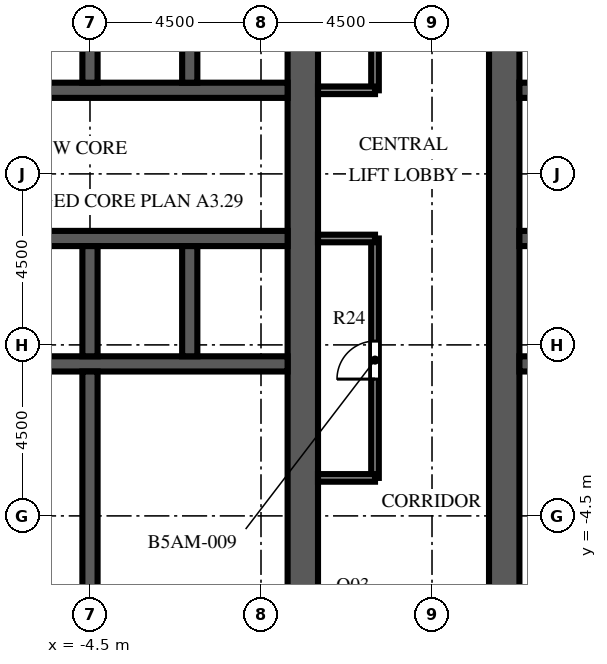
"""IFC4 building model, lengths in metres.
Left out: names, types, materials, properties, quantities, classifications, styles, units other than length and angle.
Written with IfcOpenShell. Run it as: python <this file> out.ifc"""

import sys

from ifc_helpers import new_model, si_unit, direction, frame, frame_2d, origin, place, context, subcontext, project, spatial, rectangle, extrude, element, fill, save


model = new_model("IFC4")
c1 = context("Model", 3, precision=1e-05, world=origin(), true_north=direction((0.0, 1.0)))
c2 = subcontext(c1, "Body", "Model", "MODEL_VIEW")
j1 = project(units=[si_unit("LENGTHUNIT", "METRE"), si_unit("PLANEANGLEUNIT", "RADIAN")], contexts=[c1])
p1 = place(None, origin())
s1 = spatial("IfcSite", under=j1, at=p1, CompositionType="ELEMENT")
p2 = place(p1, origin())
s2 = spatial("IfcBuilding", under=s1, at=p2, CompositionType="ELEMENT")
p3 = place(p2, frame((0.0, 0.0, 185.5)))
s3 = spatial("IfcBuildingStorey", under=s2, at=p3, CompositionType="ELEMENT", Elevation=185.5)
p4 = place(p3, frame((1.1, -9.0, 0.0), z_axis=(0.0, 0.0, 1.0), x_axis=(0.0, 1.0, 0.0)))
e1 = element("IfcWall", 1, at=p4, inside=s3, PredefinedType="SHEAR", context=c2, shape_type="SweptSolid", body=[
    extrude(rectangle(XDim=27.5, YDim=0.8, at=frame_2d((13.75, 0.0))), origin(), (0.0, 0.0, 1.0), 6.0),
])
p5 = place(p4, frame((12.55, 0.0, 0.0)))
e2 = element("IfcOpeningElement", 2, at=p5, cuts=e1, PredefinedType="OPENING", context=c2, shape_type="SweptSolid", body=[
    extrude(rectangle(XDim=2.4, YDim=2.4, at=frame_2d((1.2, 1.2))), frame((0.0, 0.41, 0.0), z_axis=(0.0, -1.0, 0.0), x_axis=(1.0, 0.0, 0.0)), (0.0, 0.0, 1.0), 0.82),
])
p6 = place(p4, frame((3.85, 0.0, 0.0)))
e3 = element("IfcOpeningElement", 3, at=p6, cuts=e1, PredefinedType="OPENING", context=c2, shape_type="SweptSolid", body=[
    extrude(rectangle(XDim=0.95, YDim=2.1, at=frame_2d((0.475, 1.05))), frame((0.0, 0.41, 0.0), z_axis=(0.0, -1.0, 0.0), x_axis=(1.0, 0.0, 0.0)), (0.0, 0.0, 1.0), 0.82),
])
p7 = place(p4, frame((23.475, 0.0, 0.0)))
e4 = element("IfcOpeningElement", 4, at=p7, cuts=e1, PredefinedType="OPENING", context=c2, shape_type="SweptSolid", body=[
    extrude(rectangle(XDim=1.2, YDim=2.1, at=frame_2d((0.6, 1.05))), frame((0.0, 0.41, 0.0), z_axis=(0.0, -1.0, 0.0), x_axis=(1.0, 0.0, 0.0)), (0.0, 0.0, 1.0), 0.82),
])
p8 = place(p3, frame((-9.7, -0.5, 0.0), z_axis=(0.0, 0.0, 1.0), x_axis=(1.0, 0.0, 0.0)))
e5 = element("IfcWall", 5, at=p8, inside=s3, PredefinedType="SHEAR", context=c2, shape_type="SweptSolid", body=[
    extrude(rectangle(XDim=10.4, YDim=0.4, at=frame_2d((5.2, 0.0))), origin(), (0.0, 0.0, 1.0), 6.0),
])
p9 = place(p3, frame((-9.7, 2.8, 0.0), z_axis=(0.0, 0.0, 1.0), x_axis=(1.0, 0.0, 0.0)))
e6 = element("IfcWall", 6, at=p9, inside=s3, PredefinedType="SHEAR", context=c2, shape_type="SweptSolid", body=[
    extrude(rectangle(XDim=10.4, YDim=0.4, at=frame_2d((5.2, 0.0))), origin(), (0.0, 0.0, 1.0), 6.0),
])
p10 = place(p9, frame((0.738, 0.0, 0.0)))
e7 = element("IfcOpeningElement", 7, at=p10, cuts=e6, PredefinedType="OPENING", context=c2, shape_type="SweptSolid", body=[
    extrude(rectangle(XDim=1.1, YDim=2.1, at=frame_2d((0.55, 1.05))), frame((0.0, 0.21, 0.0), z_axis=(0.0, -1.0, 0.0), x_axis=(1.0, 0.0, 0.0)), (0.0, 0.0, 1.0), 0.42),
])
p11 = place(p9, frame((3.337, 0.0, 0.0)))
e8 = element("IfcOpeningElement", 8, at=p11, cuts=e6, PredefinedType="OPENING", context=c2, shape_type="SweptSolid", body=[
    extrude(rectangle(XDim=1.1, YDim=2.1, at=frame_2d((0.55, 1.05))), frame((0.0, 0.21, 0.0), z_axis=(0.0, -1.0, 0.0), x_axis=(1.0, 0.0, 0.0)), (0.0, 0.0, 1.0), 0.42),
])
p12 = place(p9, frame((6.012, 0.0, 0.0)))
e9 = element("IfcOpeningElement", 9, at=p12, cuts=e6, PredefinedType="OPENING", context=c2, shape_type="SweptSolid", body=[
    extrude(rectangle(XDim=1.0, YDim=2.1, at=frame_2d((0.5, 1.05))), frame((0.0, 0.21, 0.0), z_axis=(0.0, -1.0, 0.0), x_axis=(1.0, 0.0, 0.0)), (0.0, 0.0, 1.0), 0.42),
])
p13 = place(p9, frame((8.613, 0.0, 0.0)))
e10 = element("IfcOpeningElement", 10, at=p13, cuts=e6, PredefinedType="OPENING", context=c2, shape_type="SweptSolid", body=[
    extrude(rectangle(XDim=1.0, YDim=2.1, at=frame_2d((0.5, 1.05))), frame((0.0, 0.21, 0.0), z_axis=(0.0, -1.0, 0.0), x_axis=(1.0, 0.0, 0.0)), (0.0, 0.0, 1.0), 0.42),
])
p14 = place(p3, frame((-9.7, 6.7, 0.0), z_axis=(0.0, 0.0, 1.0), x_axis=(1.0, 0.0, 0.0)))
e11 = element("IfcWall", 11, at=p14, inside=s3, PredefinedType="SHEAR", context=c2, shape_type="SweptSolid", body=[
    extrude(rectangle(XDim=10.4, YDim=0.4, at=frame_2d((5.2, 0.0))), origin(), (0.0, 0.0, 1.0), 6.0),
])
p15 = place(p14, frame((3.337, 0.0, 0.0)))
e12 = element("IfcOpeningElement", 12, at=p15, cuts=e11, PredefinedType="OPENING", context=c2, shape_type="SweptSolid", body=[
    extrude(rectangle(XDim=1.1, YDim=2.1, at=frame_2d((0.55, 1.05))), frame((0.0, 0.21, 0.0), z_axis=(0.0, -1.0, 0.0), x_axis=(1.0, 0.0, 0.0)), (0.0, 0.0, 1.0), 0.42),
])
p16 = place(p14, frame((5.962, 0.0, 0.0)))
e13 = element("IfcOpeningElement", 13, at=p16, cuts=e11, PredefinedType="OPENING", context=c2, shape_type="SweptSolid", body=[
    extrude(rectangle(XDim=1.1, YDim=2.1, at=frame_2d((0.55, 1.05))), frame((0.0, 0.21, 0.0), z_axis=(0.0, -1.0, 0.0), x_axis=(1.0, 0.0, 0.0)), (0.0, 0.0, 1.0), 0.42),
])
p17 = place(p14, frame((8.663, 0.0, 0.0)))
e14 = element("IfcOpeningElement", 14, at=p17, cuts=e11, PredefinedType="OPENING", context=c2, shape_type="SweptSolid", body=[
    extrude(rectangle(XDim=1.1, YDim=2.1, at=frame_2d((0.55, 1.05))), frame((0.0, 0.21, 0.0), z_axis=(0.0, -1.0, 0.0), x_axis=(1.0, 0.0, 0.0)), (0.0, 0.0, 1.0), 0.42),
])
p18 = place(p14, frame((0.688, 0.0, 0.0)))
e15 = element("IfcOpeningElement", 15, at=p18, cuts=e11, PredefinedType="OPENING", context=c2, shape_type="SweptSolid", body=[
    extrude(rectangle(XDim=1.0, YDim=2.1, at=frame_2d((0.5, 1.05))), frame((0.0, 0.21, 0.0), z_axis=(0.0, -1.0, 0.0), x_axis=(1.0, 0.0, 0.0)), (0.0, 0.0, 1.0), 0.42),
])
for number, where, z_axis, x_axis in (
    (16, (-4.5, -0.3, 0.0), (0.0, 0.0, 1.0), (0.0, 1.0, 0.0)),
    (17, (-4.5, 6.9, 0.0), (0.0, 0.0, 1.0), (0.0, 1.0, 0.0)),
    (18, (-1.875, -0.3, 0.0), (0.0, 0.0, 1.0), (0.0, 1.0, 0.0)),
    (19, (-1.875, 6.9, 0.0), (0.0, 0.0, 1.0), (0.0, 1.0, 0.0)),
):
    element("IfcWall", number, at=place(p3, frame(where, z_axis=z_axis, x_axis=x_axis)), inside=s3, PredefinedType="SHEAR", context=c2, shape_type="SweptSolid", body=[
        extrude(rectangle(XDim=2.9, YDim=0.4, at=frame_2d((1.45, 0.0))), origin(), (0.0, 0.0, 1.0), 6.0),
    ])
p19 = place(p3, frame((-4.5, -8.2, 0.0), z_axis=(0.0, 0.0, 1.0), x_axis=(0.0, 1.0, 0.0)))
e20 = element("IfcWall", 20, at=p19, inside=s3, PredefinedType="SHEAR", context=c2, shape_type="SweptSolid", body=[
    extrude(rectangle(XDim=7.5, YDim=0.4, at=frame_2d((3.75, 0.0))), origin(), (0.0, 0.0, 1.0), 6.0),
])
p20 = place(p3, frame((6.4, -9.0, 0.0), z_axis=(0.0, 0.0, 1.0), x_axis=(0.0, 1.0, 0.0)))
e21 = element("IfcWall", 21, at=p20, inside=s3, PredefinedType="SHEAR", context=c2, shape_type="SweptSolid", body=[
    extrude(rectangle(XDim=27.5, YDim=0.8, at=frame_2d((13.75, 0.0))), origin(), (0.0, 0.0, 1.0), 6.0),
])
p21 = place(p20, frame((12.55, 0.0, 0.0)))
e22 = element("IfcOpeningElement", 22, at=p21, cuts=e21, PredefinedType="OPENING", context=c2, shape_type="SweptSolid", body=[
    extrude(rectangle(XDim=2.4, YDim=2.4, at=frame_2d((1.2, 1.2))), frame((0.0, 0.41, 0.0), z_axis=(0.0, -1.0, 0.0), x_axis=(1.0, 0.0, 0.0)), (0.0, 0.0, 1.0), 0.82),
])
p22 = place(p20, frame((3.85, 0.0, 0.0)))
e23 = element("IfcOpeningElement", 23, at=p22, cuts=e21, PredefinedType="OPENING", context=c2, shape_type="SweptSolid", body=[
    extrude(rectangle(XDim=0.95, YDim=2.1, at=frame_2d((0.475, 1.05))), frame((0.0, 0.41, 0.0), z_axis=(0.0, -1.0, 0.0), x_axis=(1.0, 0.0, 0.0)), (0.0, 0.0, 1.0), 0.82),
])
p23 = place(p20, frame((23.475, 0.0, 0.0)))
e24 = element("IfcOpeningElement", 24, at=p23, cuts=e21, PredefinedType="OPENING", context=c2, shape_type="SweptSolid", body=[
    extrude(rectangle(XDim=1.2, YDim=2.1, at=frame_2d((0.6, 1.05))), frame((0.0, 0.41, 0.0), z_axis=(0.0, -1.0, 0.0), x_axis=(1.0, 0.0, 0.0)), (0.0, 0.0, 1.0), 0.82),
])
p24 = place(p3, frame((6.8, -0.5, 0.0), z_axis=(0.0, 0.0, 1.0), x_axis=(1.0, 0.0, 0.0)))
e25 = element("IfcWall", 25, at=p24, inside=s3, PredefinedType="SHEAR", context=c2, shape_type="SweptSolid", body=[
    extrude(rectangle(XDim=10.4, YDim=0.4, at=frame_2d((5.2, 0.0))), origin(), (0.0, 0.0, 1.0), 6.0),
])
p25 = place(p3, frame((6.8, 2.8, 0.0), z_axis=(0.0, 0.0, 1.0), x_axis=(1.0, 0.0, 0.0)))
e26 = element("IfcWall", 26, at=p25, inside=s3, PredefinedType="SHEAR", context=c2, shape_type="SweptSolid", body=[
    extrude(rectangle(XDim=10.4, YDim=0.4, at=frame_2d((5.2, 0.0))), origin(), (0.0, 0.0, 1.0), 6.0),
])
p26 = place(p25, frame((0.738, 0.0, 0.0)))
e27 = element("IfcOpeningElement", 27, at=p26, cuts=e26, PredefinedType="OPENING", context=c2, shape_type="SweptSolid", body=[
    extrude(rectangle(XDim=1.1, YDim=2.1, at=frame_2d((0.55, 1.05))), frame((0.0, 0.21, 0.0), z_axis=(0.0, -1.0, 0.0), x_axis=(1.0, 0.0, 0.0)), (0.0, 0.0, 1.0), 0.42),
])
p27 = place(p25, frame((3.337, 0.0, 0.0)))
e28 = element("IfcOpeningElement", 28, at=p27, cuts=e26, PredefinedType="OPENING", context=c2, shape_type="SweptSolid", body=[
    extrude(rectangle(XDim=1.1, YDim=2.1, at=frame_2d((0.55, 1.05))), frame((0.0, 0.21, 0.0), z_axis=(0.0, -1.0, 0.0), x_axis=(1.0, 0.0, 0.0)), (0.0, 0.0, 1.0), 0.42),
])
p28 = place(p25, frame((6.012, 0.0, 0.0)))
e29 = element("IfcOpeningElement", 29, at=p28, cuts=e26, PredefinedType="OPENING", context=c2, shape_type="SweptSolid", body=[
    extrude(rectangle(XDim=1.0, YDim=2.1, at=frame_2d((0.5, 1.05))), frame((0.0, 0.21, 0.0), z_axis=(0.0, -1.0, 0.0), x_axis=(1.0, 0.0, 0.0)), (0.0, 0.0, 1.0), 0.42),
])
p29 = place(p25, frame((8.613, 0.0, 0.0)))
e30 = element("IfcOpeningElement", 30, at=p29, cuts=e26, PredefinedType="OPENING", context=c2, shape_type="SweptSolid", body=[
    extrude(rectangle(XDim=1.0, YDim=2.1, at=frame_2d((0.5, 1.05))), frame((0.0, 0.21, 0.0), z_axis=(0.0, -1.0, 0.0), x_axis=(1.0, 0.0, 0.0)), (0.0, 0.0, 1.0), 0.42),
])
p30 = place(p3, frame((6.8, 6.7, 0.0), z_axis=(0.0, 0.0, 1.0), x_axis=(1.0, 0.0, 0.0)))
e31 = element("IfcWall", 31, at=p30, inside=s3, PredefinedType="SHEAR", context=c2, shape_type="SweptSolid", body=[
    extrude(rectangle(XDim=10.4, YDim=0.4, at=frame_2d((5.2, 0.0))), origin(), (0.0, 0.0, 1.0), 6.0),
])
p31 = place(p30, frame((3.337, 0.0, 0.0)))
e32 = element("IfcOpeningElement", 32, at=p31, cuts=e31, PredefinedType="OPENING", context=c2, shape_type="SweptSolid", body=[
    extrude(rectangle(XDim=1.1, YDim=2.1, at=frame_2d((0.55, 1.05))), frame((0.0, 0.21, 0.0), z_axis=(0.0, -1.0, 0.0), x_axis=(1.0, 0.0, 0.0)), (0.0, 0.0, 1.0), 0.42),
])
p32 = place(p30, frame((5.962, 0.0, 0.0)))
e33 = element("IfcOpeningElement", 33, at=p32, cuts=e31, PredefinedType="OPENING", context=c2, shape_type="SweptSolid", body=[
    extrude(rectangle(XDim=1.1, YDim=2.1, at=frame_2d((0.55, 1.05))), frame((0.0, 0.21, 0.0), z_axis=(0.0, -1.0, 0.0), x_axis=(1.0, 0.0, 0.0)), (0.0, 0.0, 1.0), 0.42),
])
p33 = place(p30, frame((8.663, 0.0, 0.0)))
e34 = element("IfcOpeningElement", 34, at=p33, cuts=e31, PredefinedType="OPENING", context=c2, shape_type="SweptSolid", body=[
    extrude(rectangle(XDim=1.1, YDim=2.1, at=frame_2d((0.55, 1.05))), frame((0.0, 0.21, 0.0), z_axis=(0.0, -1.0, 0.0), x_axis=(1.0, 0.0, 0.0)), (0.0, 0.0, 1.0), 0.42),
])
p34 = place(p30, frame((0.688, 0.0, 0.0)))
e35 = element("IfcOpeningElement", 35, at=p34, cuts=e31, PredefinedType="OPENING", context=c2, shape_type="SweptSolid", body=[
    extrude(rectangle(XDim=1.0, YDim=2.1, at=frame_2d((0.5, 1.05))), frame((0.0, 0.21, 0.0), z_axis=(0.0, -1.0, 0.0), x_axis=(1.0, 0.0, 0.0)), (0.0, 0.0, 1.0), 0.42),
])
p35 = place(p3, frame((-4.3, -5.35, 0.0), z_axis=(0.0, 0.0, 1.0), x_axis=(1.0, 0.0, 0.0)))
e36 = element("IfcWall", 36, at=p35, inside=s3, PredefinedType="PARTITIONING", context=c2, shape_type="SweptSolid", body=[
    extrude(rectangle(XDim=5.0, YDim=0.1, at=frame_2d((2.5, 0.0))), origin(), (0.0, 0.0, 1.0), 5.55),
])
p36 = place(p35, frame((2.0, 0.0, 0.0)))
e37 = element("IfcOpeningElement", 37, at=p36, cuts=e36, PredefinedType="OPENING", context=c2, shape_type="SweptSolid", body=[
    extrude(rectangle(XDim=1.0, YDim=2.1, at=frame_2d((0.5, 1.05))), frame((0.0, 0.06, 0.0), z_axis=(0.0, -1.0, 0.0), x_axis=(1.0, 0.0, 0.0)), (0.0, 0.0, 1.0), 0.12),
])
p37 = place(p3, frame((-2.4, -4.0, 0.0), z_axis=(0.0, 0.0, 1.0), x_axis=(1.0, 0.0, 0.0)))
e38 = element("IfcWall", 38, at=p37, inside=s3, PredefinedType="PARTITIONING", context=c2, shape_type="SweptSolid", body=[
    extrude(rectangle(XDim=3.1, YDim=0.1, at=frame_2d((1.55, 0.0))), origin(), (0.0, 0.0, 1.0), 5.55),
])
p38 = place(p37, frame((1.05, 0.0, 0.0)))
e39 = element("IfcOpeningElement", 39, at=p38, cuts=e38, PredefinedType="OPENING", context=c2, shape_type="SweptSolid", body=[
    extrude(rectangle(XDim=1.0, YDim=2.1, at=frame_2d((0.5, 1.05))), frame((0.0, 0.06, 0.0), z_axis=(0.0, -1.0, 0.0), x_axis=(1.0, 0.0, 0.0)), (0.0, 0.0, 1.0), 0.12),
])
p39 = place(p3, frame((-4.3, -4.0, 0.0), z_axis=(0.0, 0.0, 1.0), x_axis=(1.0, 0.0, 0.0)))
e40 = element("IfcWall", 40, at=p39, inside=s3, PredefinedType="PARTITIONING", context=c2, shape_type="SweptSolid", body=[
    extrude(rectangle(XDim=1.9, YDim=0.1, at=frame_2d((0.95, 0.0))), origin(), (0.0, 0.0, 1.0), 5.55),
])
p40 = place(p39, frame((0.45, 0.0, 0.0)))
e41 = element("IfcOpeningElement", 41, at=p40, cuts=e40, PredefinedType="OPENING", context=c2, shape_type="SweptSolid", body=[
    extrude(rectangle(XDim=1.0, YDim=2.1, at=frame_2d((0.5, 1.05))), frame((0.0, 0.06, 0.0), z_axis=(0.0, -1.0, 0.0), x_axis=(1.0, 0.0, 0.0)), (0.0, 0.0, 1.0), 0.12),
])
p41 = place(p3, frame((-2.4, -4.0, 0.0), z_axis=(0.0, 0.0, 1.0), x_axis=(0.0, 1.0, 0.0)))
e42 = element("IfcWall", 42, at=p41, inside=s3, PredefinedType="PARTITIONING", context=c2, shape_type="SweptSolid", body=[
    extrude(rectangle(XDim=3.3, YDim=0.1, at=frame_2d((1.65, 0.0))), origin(), (0.0, 0.0, 1.0), 5.55),
])
p42 = place(p3, frame((6.8, -5.35, 0.0), z_axis=(0.0, 0.0, 1.0), x_axis=(1.0, 0.0, 0.0)))
e43 = element("IfcWall", 43, at=p42, inside=s3, PredefinedType="PARTITIONING", context=c2, shape_type="SweptSolid", body=[
    extrude(rectangle(XDim=5.0, YDim=0.1, at=frame_2d((2.5, 0.0))), origin(), (0.0, 0.0, 1.0), 5.55),
])
p43 = place(p42, frame((2.0, 0.0, 0.0)))
e44 = element("IfcOpeningElement", 44, at=p43, cuts=e43, PredefinedType="OPENING", context=c2, shape_type="SweptSolid", body=[
    extrude(rectangle(XDim=1.0, YDim=2.1, at=frame_2d((0.5, 1.05))), frame((0.0, 0.06, 0.0), z_axis=(0.0, -1.0, 0.0), x_axis=(1.0, 0.0, 0.0)), (0.0, 0.0, 1.0), 0.12),
])
p44 = place(p3, frame((6.8, -4.0, 0.0), z_axis=(0.0, 0.0, 1.0), x_axis=(1.0, 0.0, 0.0)))
e45 = element("IfcWall", 45, at=p44, inside=s3, PredefinedType="PARTITIONING", context=c2, shape_type="SweptSolid", body=[
    extrude(rectangle(XDim=3.1, YDim=0.1, at=frame_2d((1.55, 0.0))), origin(), (0.0, 0.0, 1.0), 5.55),
])
p45 = place(p44, frame((1.05, 0.0, 0.0)))
e46 = element("IfcOpeningElement", 46, at=p45, cuts=e45, PredefinedType="OPENING", context=c2, shape_type="SweptSolid", body=[
    extrude(rectangle(XDim=1.0, YDim=2.1, at=frame_2d((0.5, 1.05))), frame((0.0, 0.06, 0.0), z_axis=(0.0, -1.0, 0.0), x_axis=(1.0, 0.0, 0.0)), (0.0, 0.0, 1.0), 0.12),
])
p46 = place(p3, frame((3.0, -3.5, 0.0), z_axis=(0.0, 0.0, 1.0), x_axis=(0.0, 1.0, 0.0)))
e47 = element("IfcWall", 47, at=p46, inside=s3, PredefinedType="PARTITIONING", context=c2, shape_type="SweptSolid", body=[
    extrude(rectangle(XDim=6.3, YDim=0.2, at=frame_2d((3.15, 0.0))), origin(), (0.0, 0.0, 1.0), 5.55),
])
p47 = place(p46, frame((2.6, 0.0, 0.0)))
e48 = element("IfcOpeningElement", 48, at=p47, cuts=e47, PredefinedType="OPENING", context=c2, shape_type="SweptSolid", body=[
    extrude(rectangle(XDim=1.0, YDim=2.1, at=frame_2d((0.5, 1.05))), frame((0.0, 0.11, 0.0), z_axis=(0.0, -1.0, 0.0), x_axis=(1.0, 0.0, 0.0)), (0.0, 0.0, 1.0), 0.22),
])
p48 = place(p3, frame((3.0, 6.7, 0.0), z_axis=(0.0, 0.0, 1.0), x_axis=(0.0, 1.0, 0.0)))
e49 = element("IfcWall", 49, at=p48, inside=s3, PredefinedType="PARTITIONING", context=c2, shape_type="SweptSolid", body=[
    extrude(rectangle(XDim=11.8, YDim=0.2, at=frame_2d((5.9, 0.0))), origin(), (0.0, 0.0, 1.0), 5.55),
])
p49 = place(p48, frame((3.85, 0.0, 0.0)))
e50 = element("IfcOpeningElement", 50, at=p49, cuts=e49, PredefinedType="OPENING", context=c2, shape_type="SweptSolid", body=[
    extrude(rectangle(XDim=1.0, YDim=2.1, at=frame_2d((0.5, 1.05))), frame((0.0, 0.11, 0.0), z_axis=(0.0, -1.0, 0.0), x_axis=(1.0, 0.0, 0.0)), (0.0, 0.0, 1.0), 0.22),
])
for number, where, z_axis, x_axis in (
    (51, (1.5, -3.5, 0.0), (0.0, 0.0, 1.0), (1.0, 0.0, 0.0)),
    (52, (1.5, 2.8, 0.0), (0.0, 0.0, 1.0), (1.0, 0.0, 0.0)),
    (53, (1.5, 6.7, 0.0), (0.0, 0.0, 1.0), (1.0, 0.0, 0.0)),
):
    element("IfcWall", number, at=place(p3, frame(where, z_axis=z_axis, x_axis=x_axis)), inside=s3, PredefinedType="PARTITIONING", context=c2, shape_type="SweptSolid", body=[
        extrude(rectangle(XDim=1.5, YDim=0.2, at=frame_2d((0.75, 0.0))), origin(), (0.0, 0.0, 1.0), 5.55),
    ])
p50 = place(p11, origin())
e54 = element("IfcDoor", 54, at=p50, inside=s3, OperationType="DOUBLE_DOOR_SLIDING", PredefinedType="DOOR", context=c2, shape_type="SweptSolid", body=[
    extrude(rectangle(XDim=1.1, YDim=2.1, at=frame_2d((0.55, 1.05))), frame((0.0, 0.025, 0.0), z_axis=(0.0, -1.0, 0.0), x_axis=(1.0, 0.0, 0.0)), (0.0, 0.0, 1.0), 0.05),
])
fill(e8, e54)
p51 = place(p15, origin())
e55 = element("IfcDoor", 55, at=p51, inside=s3, OperationType="DOUBLE_DOOR_SLIDING", PredefinedType="DOOR", context=c2, shape_type="SweptSolid", body=[
    extrude(rectangle(XDim=1.1, YDim=2.1, at=frame_2d((0.55, 1.05))), frame((0.0, 0.025, 0.0), z_axis=(0.0, -1.0, 0.0), x_axis=(1.0, 0.0, 0.0)), (0.0, 0.0, 1.0), 0.05),
])
fill(e12, e55)
p52 = place(p16, origin())
e56 = element("IfcDoor", 56, at=p52, inside=s3, OperationType="DOUBLE_DOOR_SLIDING", PredefinedType="DOOR", context=c2, shape_type="SweptSolid", body=[
    extrude(rectangle(XDim=1.1, YDim=2.1, at=frame_2d((0.55, 1.05))), frame((0.0, 0.025, 0.0), z_axis=(0.0, -1.0, 0.0), x_axis=(1.0, 0.0, 0.0)), (0.0, 0.0, 1.0), 0.05),
])
fill(e13, e56)
p53 = place(p17, origin())
e57 = element("IfcDoor", 57, at=p53, inside=s3, OperationType="DOUBLE_DOOR_SLIDING", PredefinedType="DOOR", context=c2, shape_type="SweptSolid", body=[
    extrude(rectangle(XDim=1.1, YDim=2.1, at=frame_2d((0.55, 1.05))), frame((0.0, 0.025, 0.0), z_axis=(0.0, -1.0, 0.0), x_axis=(1.0, 0.0, 0.0)), (0.0, 0.0, 1.0), 0.05),
])
fill(e14, e57)
p54 = place(p5, origin())
e58 = element("IfcDoor", 58, at=p54, inside=s3, OperationType="DOUBLE_DOOR_DOUBLE_SWING", PredefinedType="DOOR", context=c2, shape_type="SweptSolid", body=[
    extrude(rectangle(XDim=2.4, YDim=2.4, at=frame_2d((1.2, 1.2))), frame((0.0, 0.025, 0.0), z_axis=(0.0, -1.0, 0.0), x_axis=(1.0, 0.0, 0.0)), (0.0, 0.0, 1.0), 0.05),
])
fill(e2, e58)
p55 = place(p21, origin())
e59 = element("IfcDoor", 59, at=p55, inside=s3, OperationType="DOUBLE_DOOR_DOUBLE_SWING", PredefinedType="DOOR", context=c2, shape_type="SweptSolid", body=[
    extrude(rectangle(XDim=2.4, YDim=2.4, at=frame_2d((1.2, 1.2))), frame((0.0, 0.025, 0.0), z_axis=(0.0, -1.0, 0.0), x_axis=(1.0, 0.0, 0.0)), (0.0, 0.0, 1.0), 0.05),
])
fill(e22, e59)
p56 = place(p12, origin())
e60 = element("IfcDoor", 60, at=p56, inside=s3, OperationType="SINGLE_SWING_LEFT", PredefinedType="DOOR", context=c2, shape_type="SweptSolid", body=[
    extrude(rectangle(XDim=1.0, YDim=2.1, at=frame_2d((0.5, 1.05))), frame((0.0, 0.025, 0.0), z_axis=(0.0, -1.0, 0.0), x_axis=(1.0, 0.0, 0.0)), (0.0, 0.0, 1.0), 0.05),
])
fill(e9, e60)
p57 = place(p13, origin())
e61 = element("IfcDoor", 61, at=p57, inside=s3, OperationType="SINGLE_SWING_RIGHT", PredefinedType="DOOR", context=c2, shape_type="SweptSolid", body=[
    extrude(rectangle(XDim=1.0, YDim=2.1, at=frame_2d((0.5, 1.05))), frame((0.0, 0.025, 0.0), z_axis=(0.0, -1.0, 0.0), x_axis=(1.0, 0.0, 0.0)), (0.0, 0.0, 1.0), 0.05),
])
fill(e10, e61)
p58 = place(p6, origin())
e62 = element("IfcDoor", 62, at=p58, inside=s3, OperationType="SINGLE_SWING_LEFT", PredefinedType="DOOR", context=c2, shape_type="SweptSolid", body=[
    extrude(rectangle(XDim=0.95, YDim=2.1, at=frame_2d((0.475, 1.05))), frame((0.0, 0.375, 0.0), z_axis=(0.0, -1.0, 0.0), x_axis=(1.0, 0.0, 0.0)), (0.0, 0.0, 1.0), 0.05),
])
fill(e3, e62)
p59 = place(p36, origin())
e63 = element("IfcDoor", 63, at=p59, inside=s3, OperationType="SINGLE_SWING_RIGHT", PredefinedType="DOOR", context=c2, shape_type="SweptSolid", body=[
    extrude(rectangle(XDim=1.0, YDim=2.1, at=frame_2d((0.5, 1.05))), frame((0.0, 0.025, 0.0), z_axis=(0.0, -1.0, 0.0), x_axis=(1.0, 0.0, 0.0)), (0.0, 0.0, 1.0), 0.05),
])
fill(e37, e63)
p60 = place(p38, origin())
e64 = element("IfcDoor", 64, at=p60, inside=s3, OperationType="SINGLE_SWING_LEFT", PredefinedType="DOOR", context=c2, shape_type="SweptSolid", body=[
    extrude(rectangle(XDim=1.0, YDim=2.1, at=frame_2d((0.5, 1.05))), frame((0.0, 0.025, 0.0), z_axis=(0.0, -1.0, 0.0), x_axis=(1.0, 0.0, 0.0)), (0.0, 0.0, 1.0), 0.05),
])
fill(e39, e64)
p61 = place(p40, origin())
e65 = element("IfcDoor", 65, at=p61, inside=s3, OperationType="SINGLE_SWING_RIGHT", PredefinedType="DOOR", context=c2, shape_type="SweptSolid", body=[
    extrude(rectangle(XDim=1.0, YDim=2.1, at=frame_2d((0.5, 1.05))), frame((0.0, 0.025, 0.0), z_axis=(0.0, -1.0, 0.0), x_axis=(1.0, 0.0, 0.0)), (0.0, 0.0, 1.0), 0.05),
])
fill(e41, e65)
p62 = place(p22, origin())
e66 = element("IfcDoor", 66, at=p62, inside=s3, OperationType="SINGLE_SWING_RIGHT", PredefinedType="DOOR", context=c2, shape_type="SweptSolid", body=[
    extrude(rectangle(XDim=0.95, YDim=2.1, at=frame_2d((0.475, 1.05))), frame((0.0, -0.325, 0.0), z_axis=(0.0, -1.0, 0.0), x_axis=(1.0, 0.0, 0.0)), (0.0, 0.0, 1.0), 0.05),
])
fill(e23, e66)
p63 = place(p47, origin())
e67 = element("IfcDoor", 67, at=p63, inside=s3, OperationType="SINGLE_SWING_LEFT", PredefinedType="DOOR", context=c2, shape_type="SweptSolid", body=[
    extrude(rectangle(XDim=1.0, YDim=2.1, at=frame_2d((0.5, 1.05))), frame((0.0, 0.025, 0.0), z_axis=(0.0, -1.0, 0.0), x_axis=(1.0, 0.0, 0.0)), (0.0, 0.0, 1.0), 0.05),
])
fill(e48, e67)
save(model, sys.argv[1])
